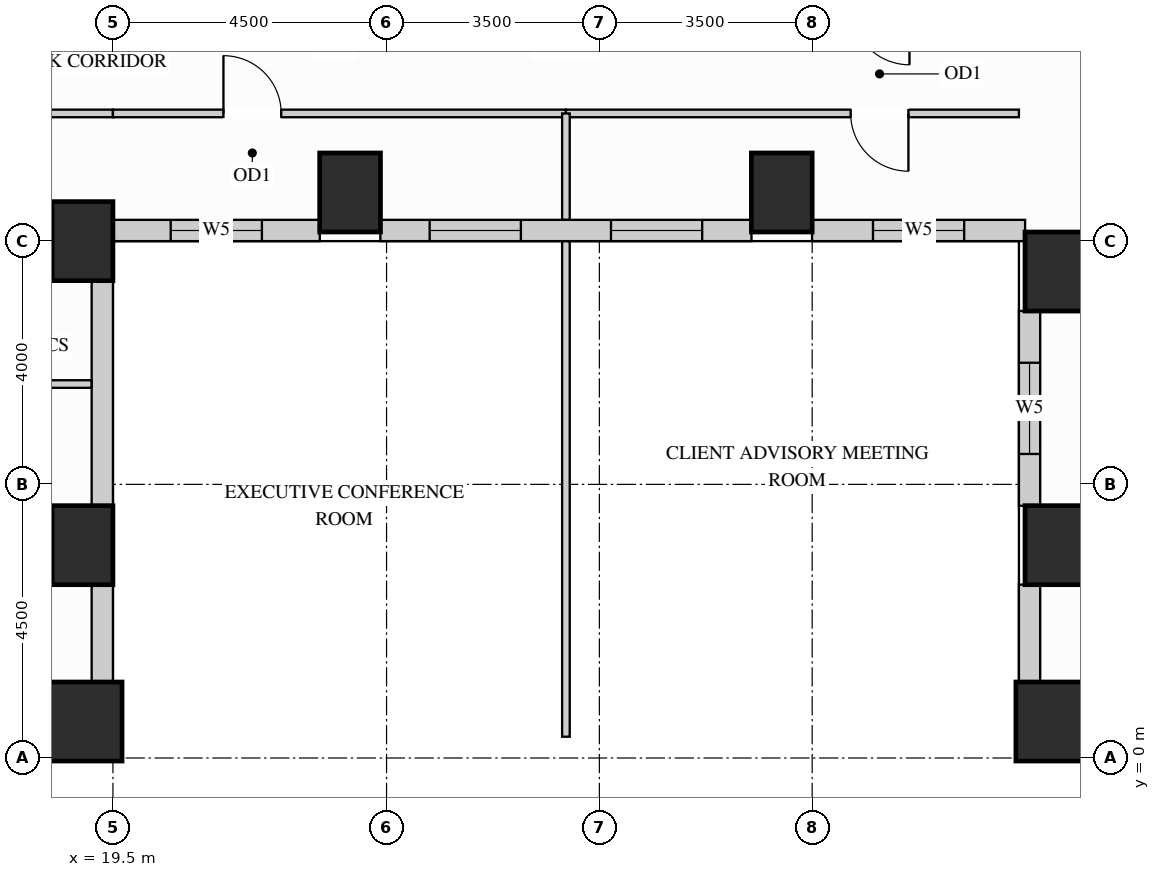
"""IFC4 building model, lengths in metres.
Left out: names, types, materials, properties, quantities, classifications, styles, units other than length and angle.
Written with IfcOpenShell. Run it as: python <this file> out.ifc"""

import sys

from ifc_helpers import new_model, si_unit, direction, frame, frame_2d, origin, origin_2d, place, context, subcontext, project, spatial, rectangle, extrude, source, transform, mapped, element, fill, save


model = new_model("IFC4")
c1 = context("Model", 3, precision=1e-05, world=origin(), true_north=direction((0.0, 1.0)))
c2 = subcontext(c1, "Body", "Model", "MODEL_VIEW")
j1 = project(units=[si_unit("LENGTHUNIT", "METRE"), si_unit("PLANEANGLEUNIT", "RADIAN")], contexts=[c1])
p1 = place(None, origin())
s1 = spatial("IfcSite", under=j1, at=p1, CompositionType="ELEMENT")
p2 = place(p1, origin())
s2 = spatial("IfcBuilding", under=s1, at=p2, CompositionType="ELEMENT")
p3 = place(p2, frame((0.0, 0.0, 40.5)))
s3 = spatial("IfcBuildingStorey", under=s2, at=p3, CompositionType="ELEMENT", Elevation=40.5)
m1 = source(origin(), c2, "Body", "SweptSolid", [
    extrude(rectangle(XDim=1.0, YDim=1.3, at=origin_2d()), origin(), (0.0, 0.0, 1.0), 3.38),
])
for number, where, z_axis, x_axis in (
    (1, (19.0, 3.5, 0.0), (0.0, 0.0, 1.0), (1.0, 0.0, 0.0)),
    (2, (19.0, 8.5, 0.0), (0.0, 0.0, 1.0), (1.0, 0.0, 0.0)),
    (3, (35.0, 3.5, 0.0), (0.0, 0.0, 1.0), (1.0, 0.0, 0.0)),
    (4, (35.0, 8.0, 0.0), (0.0, 0.0, 1.0), (1.0, 0.0, 0.0)),
    (5, (23.4, 9.3, 0.0), (0.0, 0.0, 1.0), (1.0, 0.0, 0.0)),
    (6, (30.5, 9.3, 0.0), (0.0, 0.0, 1.0), (1.0, 0.0, 0.0)),
):
    element("IfcColumn", number, at=place(p3, frame(where, z_axis=z_axis, x_axis=x_axis)), inside=s3, PredefinedType="COLUMN", context=c2, shape_type="MappedRepresentation", body=[
        mapped(m1, transform((0.0, 0.0, 0.0), x_axis=(1.0, 0.0, 0.0), y_axis=(0.0, 1.0, 0.0), z_axis=(0.0, 0.0, 1.0))),
    ])
m2 = source(origin(), c2, "Body", "SweptSolid", [
    extrude(rectangle(XDim=1.3, YDim=1.3, at=origin_2d()), origin(), (0.0, 0.0, 1.0), 3.38),
])
for number, where, z_axis, x_axis in (
    (7, (19.0, 0.6, 0.0), (0.0, 0.0, 1.0), (1.0, 0.0, 0.0)),
    (8, (35.0, 0.6, 0.0), (0.0, 0.0, 1.0), (1.0, 0.0, 0.0)),
):
    element("IfcColumn", number, at=place(p3, frame(where, z_axis=z_axis, x_axis=x_axis)), inside=s3, PredefinedType="COLUMN", context=c2, shape_type="MappedRepresentation", body=[
        mapped(m2, transform((0.0, 0.0, 0.0), x_axis=(1.0, 0.0, 0.0), y_axis=(0.0, 1.0, 0.0), z_axis=(0.0, 0.0, 1.0))),
    ])
m3 = source(origin(), c2, "Body", "SweptSolid", [
    extrude(rectangle(XDim=1.604, YDim=0.35, at=frame_2d((0.802, 0.0))), origin(), (0.0, 0.0, 1.0), 2.51),
])
p4 = place(p3, frame((19.325, 1.248, 0.0), z_axis=(0.0, 0.0, 1.0), x_axis=(0.0, 1.0, 0.0)))
e9 = element("IfcWall", 9, at=p4, inside=s3, PredefinedType="SOLIDWALL", context=c2, shape_type="MappedRepresentation", body=[
    mapped(m3, transform((0.0, 0.0, 0.0), x_axis=(1.0, 0.0, 0.0), y_axis=(0.0, 1.0, 0.0), z_axis=(0.0, 0.0, 1.0))),
])
m4 = source(origin(), c2, "Body", "SweptSolid", [
    extrude(rectangle(XDim=3.704, YDim=0.35, at=frame_2d((1.852, 0.0))), origin(), (0.0, 0.0, 1.0), 2.51),
])
p5 = place(p3, frame((19.325, 4.148, 0.0), z_axis=(0.0, 0.0, 1.0), x_axis=(0.0, 1.0, 0.0)))
e10 = element("IfcWall", 10, at=p5, inside=s3, PredefinedType="SOLIDWALL", context=c2, shape_type="MappedRepresentation", body=[
    mapped(m4, transform((0.0, 0.0, 0.0), x_axis=(1.0, 0.0, 0.0), y_axis=(0.0, 1.0, 0.0), z_axis=(0.0, 0.0, 1.0))),
])
p6 = place(p3, frame((19.498, 8.675, 0.0), z_axis=(0.0, 0.0, 1.0), x_axis=(1.0, 0.0, 0.0)))
e11 = element("IfcWall", 11, at=p6, inside=s3, PredefinedType="SOLIDWALL", context=c2, shape_type="SweptSolid", body=[
    extrude(rectangle(XDim=3.404, YDim=0.35, at=frame_2d((1.702, 0.0))), origin(), (0.0, 0.0, 1.0), 3.365),
])
p7 = place(p6, frame((0.952, 0.0, 0.78)))
e12 = element("IfcOpeningElement", 12, at=p7, cuts=e11, PredefinedType="OPENING", context=c2, shape_type="SweptSolid", body=[
    extrude(rectangle(XDim=1.5, YDim=2.0, at=frame_2d((0.75, 1.0))), frame((0.0, 0.185, 0.0), z_axis=(0.0, -1.0, 0.0), x_axis=(1.0, 0.0, 0.0)), (0.0, 0.0, 1.0), 0.37),
])
p8 = place(p3, frame((23.898, 8.675, 0.0), z_axis=(0.0, 0.0, 1.0), x_axis=(1.0, 0.0, 0.0)))
e13 = element("IfcWall", 13, at=p8, inside=s3, PredefinedType="SOLIDWALL", context=c2, shape_type="SweptSolid", body=[
    extrude(rectangle(XDim=6.104, YDim=0.35, at=frame_2d((3.052, 0.0))), origin(), (0.0, 0.0, 1.0), 3.365),
])
p9 = place(p8, frame((0.811, 0.0, 0.78)))
e14 = element("IfcOpeningElement", 14, at=p9, cuts=e13, PredefinedType="OPENING", context=c2, shape_type="SweptSolid", body=[
    extrude(rectangle(XDim=1.5, YDim=2.0, at=frame_2d((0.75, 1.0))), frame((0.0, 0.185, 0.0), z_axis=(0.0, -1.0, 0.0), x_axis=(1.0, 0.0, 0.0)), (0.0, 0.0, 1.0), 0.37),
])
p10 = place(p8, frame((3.793, 0.0, 0.78)))
e15 = element("IfcOpeningElement", 15, at=p10, cuts=e13, PredefinedType="OPENING", context=c2, shape_type="SweptSolid", body=[
    extrude(rectangle(XDim=1.5, YDim=2.0, at=frame_2d((0.75, 1.0))), frame((0.0, 0.185, 0.0), z_axis=(0.0, -1.0, 0.0), x_axis=(1.0, 0.0, 0.0)), (0.0, 0.0, 1.0), 0.37),
])
p11 = place(p3, frame((30.998, 8.675, 0.0), z_axis=(0.0, 0.0, 1.0), x_axis=(1.0, 0.0, 0.0)))
e16 = element("IfcWall", 16, at=p11, inside=s3, PredefinedType="SOLIDWALL", context=c2, shape_type="SweptSolid", body=[
    extrude(rectangle(XDim=3.504, YDim=0.35, at=frame_2d((1.752, 0.0))), origin(), (0.0, 0.0, 1.0), 3.365),
])
p12 = place(p11, frame((1.002, 0.0, 0.78)))
e17 = element("IfcOpeningElement", 17, at=p12, cuts=e16, PredefinedType="OPENING", context=c2, shape_type="SweptSolid", body=[
    extrude(rectangle(XDim=1.5, YDim=2.0, at=frame_2d((0.75, 1.0))), frame((0.0, 0.185, 0.0), z_axis=(0.0, -1.0, 0.0), x_axis=(1.0, 0.0, 0.0)), (0.0, 0.0, 1.0), 0.37),
])
p13 = place(p3, frame((34.575, 7.352, 0.0), z_axis=(0.0, 0.0, 1.0), x_axis=(0.0, -1.0, 0.0)))
e18 = element("IfcWall", 18, at=p13, inside=s3, PredefinedType="SOLIDWALL", context=c2, shape_type="SweptSolid", body=[
    extrude(rectangle(XDim=3.204, YDim=0.35, at=frame_2d((1.602, 0.0))), origin(), (0.0, 0.0, 1.0), 2.51),
])
p14 = place(p13, frame((0.852, 0.0, 0.78)))
e19 = element("IfcOpeningElement", 19, at=p14, cuts=e18, PredefinedType="OPENING", context=c2, shape_type="SweptSolid", body=[
    extrude(rectangle(XDim=1.5, YDim=1.55, at=frame_2d((0.75, 0.775))), frame((0.0, 0.185, 0.0), z_axis=(0.0, -1.0, 0.0), x_axis=(1.0, 0.0, 0.0)), (0.0, 0.0, 1.0), 0.37),
])
p15 = place(p3, frame((34.575, 2.852, 0.0), z_axis=(0.0, 0.0, 1.0), x_axis=(0.0, -1.0, 0.0)))
e20 = element("IfcWall", 20, at=p15, inside=s3, PredefinedType="SOLIDWALL", context=c2, shape_type="MappedRepresentation", body=[
    mapped(m3, transform((0.0, 0.0, 0.0), x_axis=(1.0, 0.0, 0.0), y_axis=(0.0, 1.0, 0.0), z_axis=(0.0, 0.0, 1.0))),
])
m5 = source(origin(), c2, "Body", "SweptSolid", [
    extrude(rectangle(XDim=2.45, YDim=0.125, at=frame_2d((1.225, 0.0))), origin(), (0.0, 0.0, 1.0), 3.365),
])
p16 = place(p3, frame((17.05, 10.6, 0.0), z_axis=(0.0, 0.0, 1.0), x_axis=(1.0, 0.0, 0.0)))
e21 = element("IfcWall", 21, at=p16, inside=s3, PredefinedType="PARTITIONING", context=c2, shape_type="MappedRepresentation", body=[
    mapped(m5, transform((0.0, 0.0, 0.0), x_axis=(1.0, 0.0, 0.0), y_axis=(0.0, 1.0, 0.0), z_axis=(0.0, 0.0, 1.0))),
])
p17 = place(p3, frame((19.5, 10.6, 0.0), z_axis=(0.0, 0.0, 1.0), x_axis=(1.0, 0.0, 0.0)))
e22 = element("IfcWall", 22, at=p17, inside=s3, PredefinedType="PARTITIONING", context=c2, shape_type="SweptSolid", body=[
    extrude(rectangle(XDim=7.45, YDim=0.125, at=frame_2d((3.725, 0.0))), origin(), (0.0, 0.0, 1.0), 3.365),
])
p18 = place(p17, frame((1.817, 0.0, 0.0)))
e23 = element("IfcOpeningElement", 23, at=p18, cuts=e22, PredefinedType="OPENING", context=c2, shape_type="SweptSolid", body=[
    extrude(rectangle(XDim=0.95, YDim=2.15, at=frame_2d((0.475, 1.075))), frame((0.0, 0.073, 0.0), z_axis=(0.0, -1.0, 0.0), x_axis=(1.0, 0.0, 0.0)), (0.0, 0.0, 1.0), 0.145),
])
p19 = place(p3, frame((26.95, 10.6, 0.0), z_axis=(0.0, 0.0, 1.0), x_axis=(1.0, 0.0, 0.0)))
e24 = element("IfcWall", 24, at=p19, inside=s3, PredefinedType="PARTITIONING", context=c2, shape_type="SweptSolid", body=[
    extrude(rectangle(XDim=7.45, YDim=0.125, at=frame_2d((3.725, 0.0))), origin(), (0.0, 0.0, 1.0), 3.365),
])
p20 = place(p19, frame((4.683, 0.0, 0.0)))
e25 = element("IfcOpeningElement", 25, at=p20, cuts=e24, PredefinedType="OPENING", context=c2, shape_type="SweptSolid", body=[
    extrude(rectangle(XDim=0.95, YDim=2.15, at=frame_2d((0.475, 1.075))), frame((0.0, 0.073, 0.0), z_axis=(0.0, -1.0, 0.0), x_axis=(1.0, 0.0, 0.0)), (0.0, 0.0, 1.0), 0.145),
])
m6 = source(origin(), c2, "Body", "SweptSolid", [
    extrude(rectangle(XDim=8.148, YDim=0.125, at=frame_2d((4.074, 0.0))), origin(), (0.0, 0.0, 1.0), 3.365),
])
p21 = place(p3, frame((26.95, 0.35, 0.0), z_axis=(0.0, 0.0, 1.0), x_axis=(0.0, 1.0, 0.0)))
e26 = element("IfcWall", 26, at=p21, inside=s3, PredefinedType="PARTITIONING", context=c2, shape_type="MappedRepresentation", body=[
    mapped(m6, transform((0.0, 0.0, 0.0), x_axis=(1.0, 0.0, 0.0), y_axis=(0.0, 1.0, 0.0), z_axis=(0.0, 0.0, 1.0))),
])
m7 = source(origin(), c2, "Body", "SweptSolid", [
    extrude(rectangle(XDim=1.748, YDim=0.125, at=frame_2d((0.874, 0.0))), origin(), (0.0, 0.0, 1.0), 3.365),
])
p22 = place(p3, frame((26.95, 8.852, 0.0), z_axis=(0.0, 0.0, 1.0), x_axis=(0.0, 1.0, 0.0)))
e27 = element("IfcWall", 27, at=p22, inside=s3, PredefinedType="PARTITIONING", context=c2, shape_type="MappedRepresentation", body=[
    mapped(m7, transform((0.0, 0.0, 0.0), x_axis=(1.0, 0.0, 0.0), y_axis=(0.0, 1.0, 0.0), z_axis=(0.0, 0.0, 1.0))),
])
m8 = source(origin(), c2, "Body", "SweptSolid", [
    extrude(rectangle(XDim=2.098, YDim=0.125, at=frame_2d((1.049, 0.0))), origin(), (0.0, 0.0, 1.0), 3.365),
])
p23 = place(p3, frame((17.05, 6.15, 0.0), z_axis=(0.0, 0.0, 1.0), x_axis=(1.0, 0.0, 0.0)))
e28 = element("IfcWall", 28, at=p23, inside=s3, PredefinedType="PARTITIONING", context=c2, shape_type="MappedRepresentation", body=[
    mapped(m8, transform((0.0, 0.0, 0.0), x_axis=(1.0, 0.0, 0.0), y_axis=(0.0, 1.0, 0.0), z_axis=(0.0, 0.0, 1.0))),
])
m9 = source(origin(), c2, "Body", "SweptSolid", [
    extrude(rectangle(XDim=0.95, YDim=2.15, at=frame_2d((0.475, 1.075))), frame((0.0, 0.025, 0.0), z_axis=(0.0, -1.0, 0.0), x_axis=(1.0, 0.0, 0.0)), (0.0, 0.0, 1.0), 0.05),
])
p24 = place(p18, origin())
e29 = element("IfcDoor", 29, at=p24, inside=s3, OperationType="SINGLE_SWING_LEFT", PredefinedType="DOOR", context=c2, shape_type="MappedRepresentation", body=[
    mapped(m9, transform((0.0, 0.0, 0.0), x_axis=(1.0, 0.0, 0.0), y_axis=(0.0, 1.0, 0.0), z_axis=(0.0, 0.0, 1.0))),
])
fill(e23, e29)
p25 = place(p20, origin())
e30 = element("IfcDoor", 30, at=p25, inside=s3, OperationType="SINGLE_SWING_RIGHT", PredefinedType="DOOR", context=c2, shape_type="MappedRepresentation", body=[
    mapped(m9, transform((0.0, 0.0, 0.0), x_axis=(1.0, 0.0, 0.0), y_axis=(0.0, 1.0, 0.0), z_axis=(0.0, 0.0, 1.0))),
])
fill(e25, e30)
m10 = source(origin(), c2, "Body", "SweptSolid", [
    extrude(rectangle(XDim=1.5, YDim=2.0, at=frame_2d((0.75, 1.0))), frame((0.0, 0.03, 0.0), z_axis=(0.0, -1.0, 0.0), x_axis=(1.0, 0.0, 0.0)), (0.0, 0.0, 1.0), 0.06),
])
p26 = place(p7, origin())
e31 = element("IfcWindow", 31, at=p26, inside=s3, PartitioningType="SINGLE_PANEL", PredefinedType="WINDOW", context=c2, shape_type="MappedRepresentation", body=[
    mapped(m10, transform((0.0, 0.0, 0.0), x_axis=(1.0, 0.0, 0.0), y_axis=(0.0, 1.0, 0.0), z_axis=(0.0, 0.0, 1.0))),
])
fill(e12, e31)
p27 = place(p9, origin())
e32 = element("IfcWindow", 32, at=p27, inside=s3, PartitioningType="SINGLE_PANEL", PredefinedType="WINDOW", context=c2, shape_type="MappedRepresentation", body=[
    mapped(m10, transform((0.0, 0.0, 0.0), x_axis=(1.0, 0.0, 0.0), y_axis=(0.0, 1.0, 0.0), z_axis=(0.0, 0.0, 1.0))),
])
fill(e14, e32)
p28 = place(p10, origin())
e33 = element("IfcWindow", 33, at=p28, inside=s3, PartitioningType="SINGLE_PANEL", PredefinedType="WINDOW", context=c2, shape_type="MappedRepresentation", body=[
    mapped(m10, transform((0.0, 0.0, 0.0), x_axis=(1.0, 0.0, 0.0), y_axis=(0.0, 1.0, 0.0), z_axis=(0.0, 0.0, 1.0))),
])
fill(e15, e33)
p29 = place(p12, origin())
e34 = element("IfcWindow", 34, at=p29, inside=s3, PartitioningType="SINGLE_PANEL", PredefinedType="WINDOW", context=c2, shape_type="MappedRepresentation", body=[
    mapped(m10, transform((0.0, 0.0, 0.0), x_axis=(1.0, 0.0, 0.0), y_axis=(0.0, 1.0, 0.0), z_axis=(0.0, 0.0, 1.0))),
])
fill(e17, e34)
m11 = source(origin(), c2, "Body", "SweptSolid", [
    extrude(rectangle(XDim=1.5, YDim=1.55, at=frame_2d((0.75, 0.775))), frame((0.0, 0.03, 0.0), z_axis=(0.0, -1.0, 0.0), x_axis=(1.0, 0.0, 0.0)), (0.0, 0.0, 1.0), 0.06),
])
p30 = place(p14, origin())
e35 = element("IfcWindow", 35, at=p30, inside=s3, PartitioningType="SINGLE_PANEL", PredefinedType="WINDOW", context=c2, shape_type="MappedRepresentation", body=[
    mapped(m11, transform((0.0, 0.0, 0.0), x_axis=(1.0, 0.0, 0.0), y_axis=(0.0, 1.0, 0.0), z_axis=(0.0, 0.0, 1.0))),
])
fill(e19, e35)
save(model, sys.argv[1])
